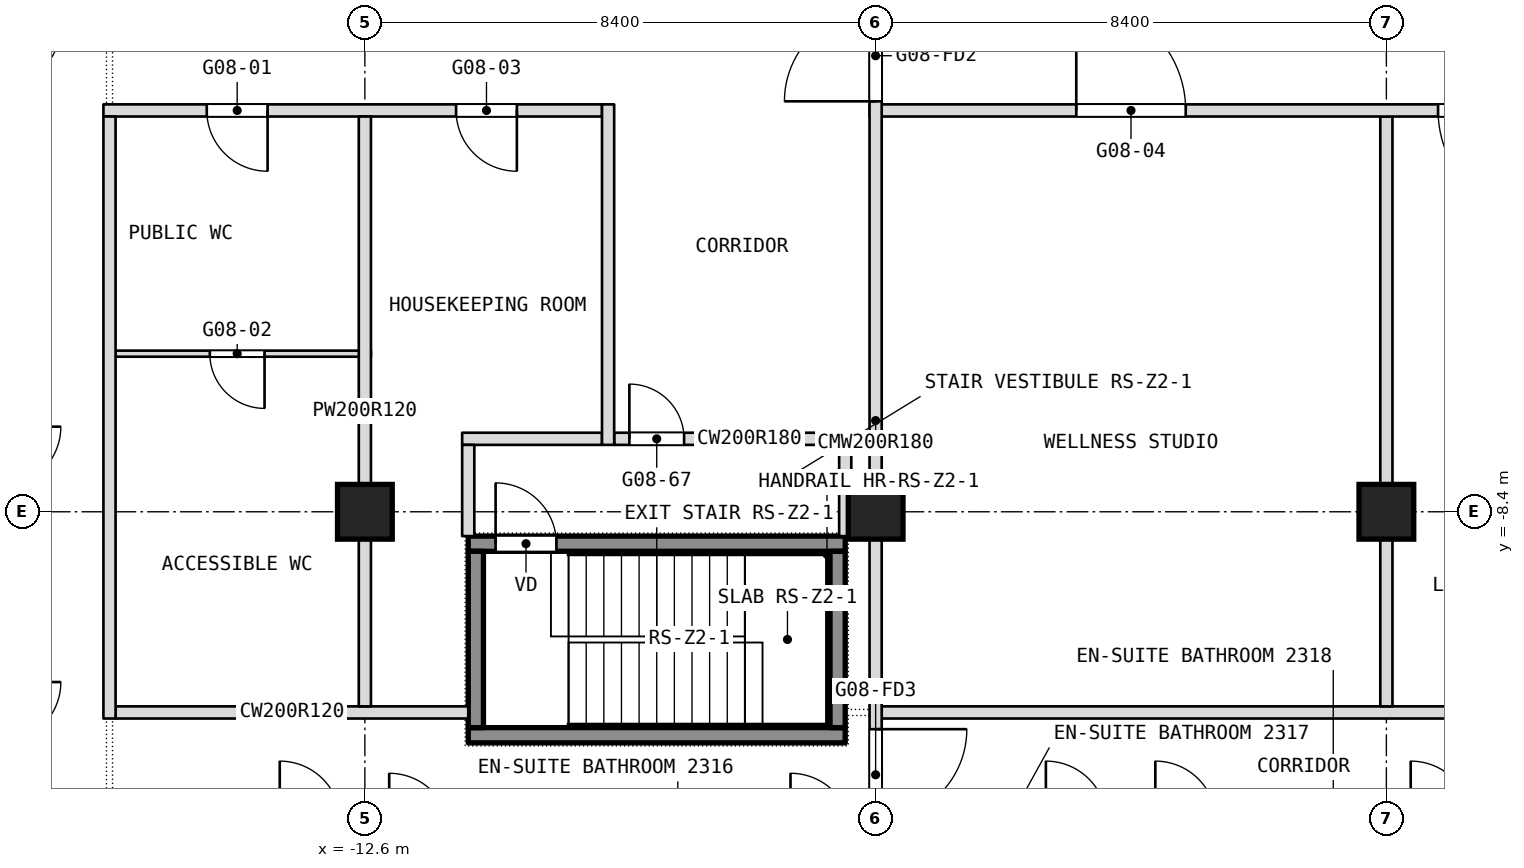
"""IFC4 building model, lengths in metres.
Left out: names, types, materials, properties, quantities, classifications, styles, units other than length and angle.
Written with IfcOpenShell. Run it as: python <this file> out.ifc"""

import sys

from ifc_helpers import new_model, si_unit, direction, frame, frame_2d, origin, origin_2d, place, context, subcontext, project, spatial, rectangle, extrude, element, fill, save


model = new_model("IFC4")
c1 = context("Model", 3, precision=1e-05, world=origin(), true_north=direction((0.0, 1.0)))
c2 = subcontext(c1, "Body", "Model", "MODEL_VIEW")
j1 = project(units=[si_unit("LENGTHUNIT", "METRE"), si_unit("PLANEANGLEUNIT", "RADIAN")], contexts=[c1])
p1 = place(None, origin())
s1 = spatial("IfcSite", under=j1, at=p1, CompositionType="ELEMENT")
p2 = place(p1, origin())
s2 = spatial("IfcBuilding", under=s1, at=p2, CompositionType="ELEMENT")
p3 = place(p2, frame((0.0, 0.0, 108.5)))
s3 = spatial("IfcBuildingStorey", under=s2, at=p3, CompositionType="ELEMENT", Elevation=108.5)
for number, where, z_axis, x_axis in (
    (1, (-12.6, -8.4, 0.0), (0.0, 0.0, 1.0), (1.0, 0.0, 0.0)),
    (2, (-4.2, -8.4, 0.0), (0.0, 0.0, 1.0), (1.0, 0.0, 0.0)),
    (3, (4.2, -8.4, 0.0), (0.0, 0.0, 1.0), (1.0, 0.0, 0.0)),
):
    element("IfcColumn", number, at=place(p3, frame(where, z_axis=z_axis, x_axis=x_axis)), inside=s3, PredefinedType="COLUMN", context=c2, shape_type="SweptSolid", body=[
        extrude(rectangle(XDim=0.9, YDim=0.9, at=origin_2d()), origin(), (0.0, 0.0, 1.0), 3.6),
    ])
p4 = place(p3, frame((-16.7, -11.7, 0.0), z_axis=(0.0, 0.0, 1.0), x_axis=(1.0, 0.0, 0.0)))
e4 = element("IfcWall", 4, at=p4, inside=s3, PredefinedType="PARTITIONING", context=c2, shape_type="SweptSolid", body=[
    extrude(rectangle(XDim=5.8, YDim=0.2, at=frame_2d((2.9, 0.0))), origin(), (0.0, 0.0, 1.0), 3.34),
])
p5 = place(p3, frame((-4.1, -11.7, 0.0), z_axis=(0.0, 0.0, 1.0), x_axis=(1.0, 0.0, 0.0)))
e5 = element("IfcWall", 5, at=p5, inside=s3, PredefinedType="PARTITIONING", context=c2, shape_type="SweptSolid", body=[
    extrude(rectangle(XDim=20.8, YDim=0.2, at=frame_2d((10.4, 0.0))), origin(), (0.0, 0.0, 1.0), 3.34),
])
p6 = place(p3, frame((-11.0, -7.2, 0.0), z_axis=(0.0, 0.0, 1.0), x_axis=(1.0, 0.0, 0.0)))
e6 = element("IfcWall", 6, at=p6, inside=s3, PredefinedType="PARTITIONING", context=c2, shape_type="SweptSolid", body=[
    extrude(rectangle(XDim=2.3, YDim=0.2, at=frame_2d((1.15, 0.0))), origin(), (0.0, 0.0, 1.0), 3.34),
])
p7 = place(p3, frame((-8.5, -7.2, 0.0), z_axis=(0.0, 0.0, 1.0), x_axis=(1.0, 0.0, 0.0)))
e7 = element("IfcWall", 7, at=p7, inside=s3, PredefinedType="PARTITIONING", context=c2, shape_type="SweptSolid", body=[
    extrude(rectangle(XDim=3.7, YDim=0.2, at=frame_2d((1.85, 0.0))), origin(), (0.0, 0.0, 1.0), 3.34),
])
p8 = place(p7, frame((0.25, 0.0, 0.0)))
e8 = element("IfcOpeningElement", 8, at=p8, cuts=e7, PredefinedType="OPENING", context=c2, shape_type="SweptSolid", body=[
    extrude(rectangle(XDim=0.9, YDim=2.1, at=frame_2d((0.45, 1.05))), frame((0.0, 0.1, 0.0), z_axis=(0.0, -1.0, 0.0), x_axis=(1.0, 0.0, 0.0)), (0.0, 0.0, 1.0), 0.2),
])
p9 = place(p3, frame((-16.7, -5.8, 0.0), z_axis=(0.0, 0.0, 1.0), x_axis=(1.0, 0.0, 0.0)))
e9 = element("IfcWall", 9, at=p9, inside=s3, PredefinedType="PARTITIONING", context=c2, shape_type="SweptSolid", body=[
    extrude(rectangle(XDim=4.2, YDim=0.1, at=frame_2d((2.1, 0.0))), origin(), (0.0, 0.0, 1.0), 3.34),
])
p10 = place(p9, frame((1.55, 0.0, 0.0)))
e10 = element("IfcOpeningElement", 10, at=p10, cuts=e9, PredefinedType="OPENING", context=c2, shape_type="SweptSolid", body=[
    extrude(rectangle(XDim=0.9, YDim=2.1, at=frame_2d((0.45, 1.05))), frame((0.0, 0.05, 0.0), z_axis=(0.0, -1.0, 0.0), x_axis=(1.0, 0.0, 0.0)), (0.0, 0.0, 1.0), 0.1),
])
p11 = place(p3, frame((4.2, -11.6, 0.0), z_axis=(0.0, 0.0, 1.0), x_axis=(0.0, 1.0, 0.0)))
e11 = element("IfcWall", 11, at=p11, inside=s3, PredefinedType="PARTITIONING", context=c2, shape_type="SweptSolid", body=[
    extrude(rectangle(XDim=9.7, YDim=0.2, at=frame_2d((4.85, 0.0))), origin(), (0.0, 0.0, 1.0), 3.34),
])
p12 = place(p3, frame((-16.9, -1.8, 0.0), z_axis=(0.0, 0.0, 1.0), x_axis=(1.0, 0.0, 0.0)))
e12 = element("IfcWall", 12, at=p12, inside=s3, PredefinedType="PARTITIONING", context=c2, shape_type="SweptSolid", body=[
    extrude(rectangle(XDim=8.2, YDim=0.2, at=frame_2d((4.1, 0.0))), origin(), (0.0, 0.0, 1.0), 3.34),
])
p13 = place(p12, frame((1.7, 0.0, 0.0)))
e13 = element("IfcOpeningElement", 13, at=p13, cuts=e12, PredefinedType="OPENING", context=c2, shape_type="SweptSolid", body=[
    extrude(rectangle(XDim=1.0, YDim=2.1, at=frame_2d((0.5, 1.05))), frame((0.0, 0.1, 0.0), z_axis=(0.0, -1.0, 0.0), x_axis=(1.0, 0.0, 0.0)), (0.0, 0.0, 1.0), 0.2),
])
p14 = place(p12, frame((5.8, 0.0, 0.0)))
e14 = element("IfcOpeningElement", 14, at=p14, cuts=e12, PredefinedType="OPENING", context=c2, shape_type="SweptSolid", body=[
    extrude(rectangle(XDim=1.0, YDim=2.1, at=frame_2d((0.5, 1.05))), frame((0.0, 0.1, 0.0), z_axis=(0.0, -1.0, 0.0), x_axis=(1.0, 0.0, 0.0)), (0.0, 0.0, 1.0), 0.2),
])
p15 = place(p3, frame((-4.3, -1.8, 0.0), z_axis=(0.0, 0.0, 1.0), x_axis=(1.0, 0.0, 0.0)))
e15 = element("IfcWall", 15, at=p15, inside=s3, PredefinedType="PARTITIONING", context=c2, shape_type="SweptSolid", body=[
    extrude(rectangle(XDim=11.3, YDim=0.2, at=frame_2d((5.65, 0.0))), origin(), (0.0, 0.0, 1.0), 3.34),
])
p16 = place(p15, frame((3.4, 0.0, 0.0)))
e16 = element("IfcOpeningElement", 16, at=p16, cuts=e15, PredefinedType="OPENING", context=c2, shape_type="SweptSolid", body=[
    extrude(rectangle(XDim=1.8, YDim=2.1, at=frame_2d((0.9, 1.05))), frame((0.0, 0.1, 0.0), z_axis=(0.0, -1.0, 0.0), x_axis=(1.0, 0.0, 0.0)), (0.0, 0.0, 1.0), 0.2),
])
p17 = place(p15, frame((9.35, 0.0, 0.0)))
e17 = element("IfcOpeningElement", 17, at=p17, cuts=e15, PredefinedType="OPENING", context=c2, shape_type="SweptSolid", body=[
    extrude(rectangle(XDim=1.8, YDim=2.1, at=frame_2d((0.9, 1.05))), frame((0.0, 0.1, 0.0), z_axis=(0.0, -1.0, 0.0), x_axis=(1.0, 0.0, 0.0)), (0.0, 0.0, 1.0), 0.2),
])
p18 = place(p3, frame((-4.2, -13.8, 0.0), z_axis=(0.0, 0.0, 1.0), x_axis=(0.0, 1.0, 0.0)))
e18 = element("IfcWall", 18, at=p18, inside=s3, PredefinedType="PARTITIONING", context=c2, shape_type="SweptSolid", body=[
    extrude(rectangle(XDim=13.8, YDim=0.2, at=frame_2d((6.9, 0.0))), origin(), (0.0, 0.0, 1.0), 3.34),
])
p19 = place(p18, frame((12.15, 0.0, 0.0)))
e19 = element("IfcOpeningElement", 19, at=p19, cuts=e18, PredefinedType="OPENING", context=c2, shape_type="SweptSolid", body=[
    extrude(rectangle(XDim=1.5, YDim=2.1, at=frame_2d((0.75, 1.05))), frame((0.0, 0.1, 0.0), z_axis=(0.0, -1.0, 0.0), x_axis=(1.0, 0.0, 0.0)), (0.0, 0.0, 1.0), 0.2),
])
p20 = place(p18, frame((0.325, 0.0, 0.0)))
e20 = element("IfcOpeningElement", 20, at=p20, cuts=e18, PredefinedType="OPENING", context=c2, shape_type="SweptSolid", body=[
    extrude(rectangle(XDim=1.5, YDim=2.1, at=frame_2d((0.75, 1.05))), frame((0.0, 0.1, 0.0), z_axis=(0.0, -1.0, 0.0), x_axis=(1.0, 0.0, 0.0)), (0.0, 0.0, 1.0), 0.2),
])
p21 = place(p3, frame((-4.7, -8.8, 0.0), z_axis=(0.0, 0.0, 1.0), x_axis=(0.0, 1.0, 0.0)))
e21 = element("IfcWall", 21, at=p21, inside=s3, PredefinedType="PARTITIONING", context=c2, shape_type="SweptSolid", body=[
    extrude(rectangle(XDim=1.7, YDim=0.2, at=frame_2d((0.85, 0.0))), origin(), (0.0, 0.0, 1.0), 3.34),
])
p22 = place(p3, frame((-8.6, -7.3, 0.0), z_axis=(0.0, 0.0, 1.0), x_axis=(0.0, 1.0, 0.0)))
e22 = element("IfcWall", 22, at=p22, inside=s3, PredefinedType="PARTITIONING", context=c2, shape_type="SweptSolid", body=[
    extrude(rectangle(XDim=5.6, YDim=0.2, at=frame_2d((2.8, 0.0))), origin(), (0.0, 0.0, 1.0), 3.34),
])
p23 = place(p3, frame((-10.9, -8.8, 0.0), z_axis=(0.0, 0.0, 1.0), x_axis=(0.0, 1.0, 0.0)))
e23 = element("IfcWall", 23, at=p23, inside=s3, PredefinedType="PARTITIONING", context=c2, shape_type="SweptSolid", body=[
    extrude(rectangle(XDim=1.5, YDim=0.2, at=frame_2d((0.75, 0.0))), origin(), (0.0, 0.0, 1.0), 3.34),
])
p24 = place(p3, frame((-12.6, -11.6, 0.0), z_axis=(0.0, 0.0, 1.0), x_axis=(0.0, 1.0, 0.0)))
e24 = element("IfcWall", 24, at=p24, inside=s3, PredefinedType="PARTITIONING", context=c2, shape_type="SweptSolid", body=[
    extrude(rectangle(XDim=9.7, YDim=0.2, at=frame_2d((4.85, 0.0))), origin(), (0.0, 0.0, 1.0), 3.34),
])
p25 = place(p3, frame((-16.8, -11.8, 0.0), z_axis=(0.0, 0.0, 1.0), x_axis=(0.0, 1.0, 0.0)))
e25 = element("IfcWall", 25, at=p25, inside=s3, PredefinedType="PARTITIONING", context=c2, shape_type="SweptSolid", body=[
    extrude(rectangle(XDim=9.9, YDim=0.2, at=frame_2d((4.95, 0.0))), origin(), (0.0, 0.0, 1.0), 3.34),
])
p26 = place(p3, frame((-10.9, -12.075, 0.1), z_axis=(0.0, 0.0, 1.0), x_axis=(1.0, 0.0, 0.0)))
e26 = element("IfcWall", 26, at=p26, inside=s3, PredefinedType="SHEAR", context=c2, shape_type="SweptSolid", body=[
    extrude(rectangle(XDim=6.2, YDim=0.25, at=frame_2d((3.1, 0.0))), origin(), (0.0, 0.0, 1.0), 3.6),
])
p27 = place(p3, frame((-10.9, -8.925, 0.1), z_axis=(0.0, 0.0, 1.0), x_axis=(1.0, 0.0, 0.0)))
e27 = element("IfcWall", 27, at=p27, inside=s3, PredefinedType="SHEAR", context=c2, shape_type="SweptSolid", body=[
    extrude(rectangle(XDim=6.2, YDim=0.25, at=frame_2d((3.1, 0.0))), origin(), (0.0, 0.0, 1.0), 3.6),
])
p28 = place(p27, frame((0.45, 0.0, 0.0)))
e28 = element("IfcOpeningElement", 28, at=p28, cuts=e27, PredefinedType="OPENING", context=c2, shape_type="SweptSolid", body=[
    extrude(rectangle(XDim=1.0, YDim=2.1, at=frame_2d((0.5, 1.05))), frame((0.0, 0.125, 0.0), z_axis=(0.0, -1.0, 0.0), x_axis=(1.0, 0.0, 0.0)), (0.0, 0.0, 1.0), 0.25),
])
for number, where, z_axis, x_axis in (
    (29, (-10.775, -11.95, 0.1), (0.0, 0.0, 1.0), (0.0, 1.0, 0.0)),
    (30, (-4.825, -11.95, 0.1), (0.0, 0.0, 1.0), (0.0, 1.0, 0.0)),
):
    element("IfcWall", number, at=place(p3, frame(where, z_axis=z_axis, x_axis=x_axis)), inside=s3, PredefinedType="SHEAR", context=c2, shape_type="SweptSolid", body=[
        extrude(rectangle(XDim=2.9, YDim=0.25, at=frame_2d((1.45, 0.0))), origin(), (0.0, 0.0, 1.0), 3.6),
    ])
p29 = place(p8, origin())
e31 = element("IfcDoor", 31, at=p29, inside=s3, OperationType="SINGLE_SWING_RIGHT", PredefinedType="DOOR", context=c2, shape_type="SweptSolid", body=[
    extrude(rectangle(XDim=0.9, YDim=2.1, at=frame_2d((0.45, 1.05))), frame((0.0, 0.025, 0.0), z_axis=(0.0, -1.0, 0.0), x_axis=(1.0, 0.0, 0.0)), (0.0, 0.0, 1.0), 0.05),
])
fill(e8, e31)
p30 = place(p10, origin())
e32 = element("IfcDoor", 32, at=p30, inside=s3, OperationType="SINGLE_SWING_RIGHT", PredefinedType="DOOR", context=c2, shape_type="SweptSolid", body=[
    extrude(rectangle(XDim=0.9, YDim=2.1, at=frame_2d((0.45, 1.05))), frame((0.0, 0.025, 0.0), z_axis=(0.0, -1.0, 0.0), x_axis=(1.0, 0.0, 0.0)), (0.0, 0.0, 1.0), 0.05),
])
fill(e10, e32)
p31 = place(p13, origin())
e33 = element("IfcDoor", 33, at=p31, inside=s3, OperationType="SINGLE_SWING_LEFT", PredefinedType="DOOR", context=c2, shape_type="SweptSolid", body=[
    extrude(rectangle(XDim=1.0, YDim=2.1, at=frame_2d((0.5, 1.05))), frame((0.0, 0.025, 0.0), z_axis=(0.0, -1.0, 0.0), x_axis=(1.0, 0.0, 0.0)), (0.0, 0.0, 1.0), 0.05),
])
fill(e13, e33)
p32 = place(p14, origin())
e34 = element("IfcDoor", 34, at=p32, inside=s3, OperationType="SINGLE_SWING_LEFT", PredefinedType="DOOR", context=c2, shape_type="SweptSolid", body=[
    extrude(rectangle(XDim=1.0, YDim=2.1, at=frame_2d((0.5, 1.05))), frame((0.0, 0.025, 0.0), z_axis=(0.0, -1.0, 0.0), x_axis=(1.0, 0.0, 0.0)), (0.0, 0.0, 1.0), 0.05),
])
fill(e14, e34)
p33 = place(p16, origin())
e35 = element("IfcDoor", 35, at=p33, inside=s3, OperationType="DOUBLE_DOOR_SINGLE_SWING", PredefinedType="DOOR", context=c2, shape_type="SweptSolid", body=[
    extrude(rectangle(XDim=1.8, YDim=2.1, at=frame_2d((0.9, 1.05))), frame((0.0, 0.025, 0.0), z_axis=(0.0, -1.0, 0.0), x_axis=(1.0, 0.0, 0.0)), (0.0, 0.0, 1.0), 0.05),
])
fill(e16, e35)
p34 = place(p17, origin())
e36 = element("IfcDoor", 36, at=p34, inside=s3, OperationType="DOUBLE_DOOR_SINGLE_SWING", PredefinedType="DOOR", context=c2, shape_type="SweptSolid", body=[
    extrude(rectangle(XDim=1.8, YDim=2.1, at=frame_2d((0.9, 1.05))), frame((0.0, 0.025, 0.0), z_axis=(0.0, -1.0, 0.0), x_axis=(1.0, 0.0, 0.0)), (0.0, 0.0, 1.0), 0.05),
])
fill(e17, e36)
p35 = place(p28, origin())
e37 = element("IfcDoor", 37, at=p35, inside=s3, OperationType="SINGLE_SWING_LEFT", PredefinedType="DOOR", context=c2, shape_type="SweptSolid", body=[
    extrude(rectangle(XDim=1.0, YDim=2.1, at=frame_2d((0.5, 1.05))), frame((0.0, 0.025, 0.0), z_axis=(0.0, -1.0, 0.0), x_axis=(1.0, 0.0, 0.0)), (0.0, 0.0, 1.0), 0.05),
])
fill(e28, e37)
p36 = place(p19, origin())
e38 = element("IfcDoor", 38, at=p36, inside=s3, OperationType="DOUBLE_DOOR_DOUBLE_SWING", PredefinedType="DOOR", context=c2, shape_type="SweptSolid", body=[
    extrude(rectangle(XDim=1.5, YDim=2.1, at=frame_2d((0.75, 1.05))), frame((0.0, 0.025, 0.0), z_axis=(0.0, -1.0, 0.0), x_axis=(1.0, 0.0, 0.0)), (0.0, 0.0, 1.0), 0.05),
])
fill(e19, e38)
p37 = place(p20, origin())
e39 = element("IfcDoor", 39, at=p37, inside=s3, OperationType="DOUBLE_DOOR_DOUBLE_SWING", PredefinedType="DOOR", context=c2, shape_type="SweptSolid", body=[
    extrude(rectangle(XDim=1.5, YDim=2.1, at=frame_2d((0.75, 1.05))), frame((0.0, 0.025, 0.0), z_axis=(0.0, -1.0, 0.0), x_axis=(1.0, 0.0, 0.0)), (0.0, 0.0, 1.0), 0.05),
])
fill(e20, e39)
save(model, sys.argv[1])
